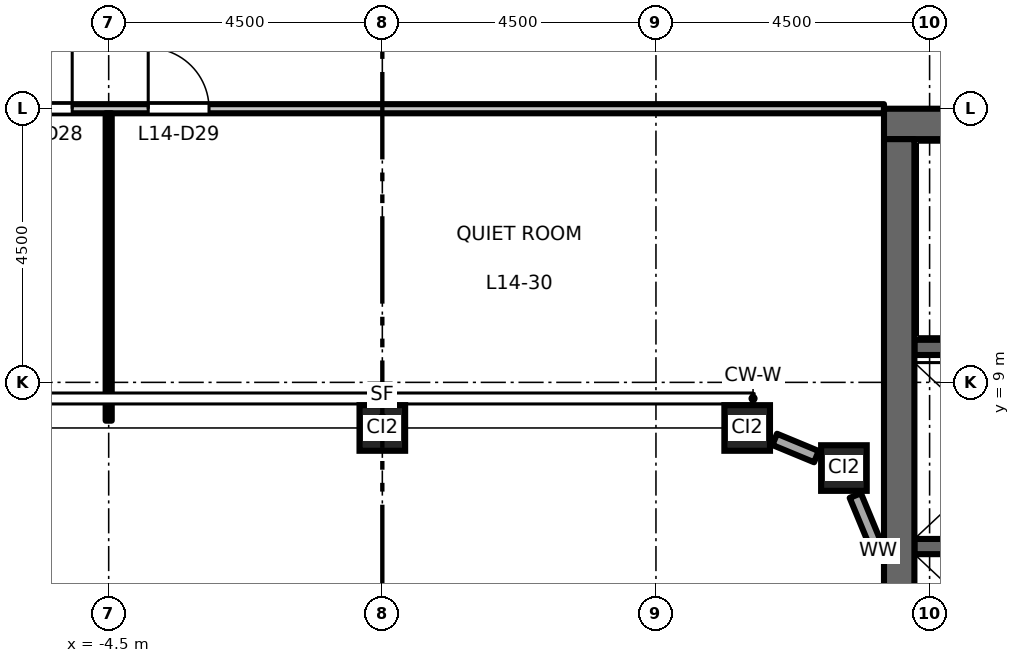
"""IFC4 building model, lengths in metres.
Left out: names, types, materials, properties, quantities, classifications, styles, units other than length and angle.
Written with IfcOpenShell. Run it as: python <this file> out.ifc"""

import sys

from ifc_helpers import new_model, si_unit, direction, frame, frame_2d, origin, origin_2d, place, context, subcontext, project, spatial, rectangle, hollow_rectangle, extrude, element, fill, save


model = new_model("IFC4")
c1 = context("Model", 3, precision=1e-05, world=origin(), true_north=direction((0.0, 1.0)))
c2 = subcontext(c1, "Body", "Model", "MODEL_VIEW")
j1 = project(units=[si_unit("LENGTHUNIT", "METRE"), si_unit("PLANEANGLEUNIT", "RADIAN")], contexts=[c1])
p1 = place(None, origin())
s1 = spatial("IfcSite", under=j1, at=p1, CompositionType="ELEMENT")
p2 = place(p1, origin())
s2 = spatial("IfcBuilding", under=s1, at=p2, CompositionType="ELEMENT")
p3 = place(p2, frame((0.0, 0.0, 67.2)))
s3 = spatial("IfcBuildingStorey", under=s2, at=p3, CompositionType="ELEMENT", Elevation=67.2)
for number, where, z_axis, x_axis in (
    (1, (0.0, 8.25, 0.0), (0.0, 0.0, 1.0), (1.0, 0.0, 0.0)),
    (2, (6.0, 8.25, 0.0), (0.0, 0.0, 1.0), (1.0, 0.0, 0.0)),
    (3, (7.591, 7.591, 0.0), (0.0, 0.0, 1.0), (1.0, 0.0, 0.0)),
):
    element("IfcColumn", number, at=place(p3, frame(where, z_axis=z_axis, x_axis=x_axis)), inside=s3, PredefinedType="COLUMN", context=c2, shape_type="SweptSolid", body=[
        extrude(hollow_rectangle(XDim=0.75, YDim=0.75, WallThickness=0.045, at=origin_2d()), origin(), (0.0, 0.0, 1.0), 4.5),
    ])
p4 = place(p3, frame((8.75, 6.3, 0.0), z_axis=(0.0, 0.0, 1.0), x_axis=(1.0, 0.0, 0.0)))
e4 = element("IfcWall", 4, at=p4, inside=s3, PredefinedType="SHEAR", context=c2, shape_type="SweptSolid", body=[
    extrude(rectangle(XDim=3.1, YDim=0.25, at=frame_2d((1.55, 0.0))), origin(), (0.0, 0.0, 1.0), 4.35),
])
p5 = place(p3, frame((8.75, 9.575, 0.0), z_axis=(0.0, 0.0, 1.0), x_axis=(1.0, 0.0, 0.0)))
e5 = element("IfcWall", 5, at=p5, inside=s3, PredefinedType="SHEAR", context=c2, shape_type="SweptSolid", body=[
    extrude(rectangle(XDim=8.0, YDim=0.25, at=frame_2d((4.0, 0.0))), origin(), (0.0, 0.0, 1.0), 4.35),
])
p6 = place(p5, frame((6.65, 0.0, 0.0)))
e6 = element("IfcOpeningElement", 6, at=p6, cuts=e5, PredefinedType="OPENING", context=c2, shape_type="SweptSolid", body=[
    extrude(rectangle(XDim=1.1, YDim=2.1, at=frame_2d((0.55, 1.05))), frame((0.0, 0.135, 0.0), z_axis=(0.0, -1.0, 0.0), x_axis=(1.0, 0.0, 0.0)), (0.0, 0.0, 1.0), 0.27),
])
p7 = place(p3, frame((8.25, 13.25, 0.0), z_axis=(0.0, 0.0, 1.0), x_axis=(1.0, 0.0, 0.0)))
e7 = element("IfcWall", 7, at=p7, inside=s3, PredefinedType="SHEAR", context=c2, shape_type="SweptSolid", body=[
    extrude(rectangle(XDim=13.5, YDim=0.5, at=frame_2d((6.75, 0.0))), origin(), (0.0, 0.0, 1.0), 4.35),
])
p8 = place(p3, frame((8.5, -13.0, 0.0), z_axis=(0.0, 0.0, 1.0), x_axis=(0.0, 1.0, 0.0)))
e8 = element("IfcWall", 8, at=p8, inside=s3, PredefinedType="SHEAR", context=c2, shape_type="SweptSolid", body=[
    extrude(rectangle(XDim=26.0, YDim=0.5, at=frame_2d((13.0, 0.0))), origin(), (0.0, 0.0, 1.0), 4.35),
])
p9 = place(p3, frame((8.154, 6.231, 0.0), z_axis=(0.0, 0.0, 1.0), x_axis=(-0.382549378284, 0.923935048136, 0.0)))
e9 = element("IfcWall", 9, at=p9, inside=s3, PredefinedType="STANDARD", context=c2, shape_type="SweptSolid", body=[
    extrude(rectangle(XDim=0.982, YDim=0.2, at=frame_2d((0.491, 0.0))), origin(), (0.0, 0.0, 1.0), 3.73),
])
p10 = place(p3, frame((7.138, 7.779, 0.0), z_axis=(0.0, 0.0, 1.0), x_axis=(-0.923940677943, 0.382535780864, 0.0)))
e10 = element("IfcWall", 10, at=p10, inside=s3, PredefinedType="STANDARD", context=c2, shape_type="SweptSolid", body=[
    extrude(rectangle(XDim=0.742, YDim=0.2, at=frame_2d((0.371, 0.0))), origin(), (0.0, 0.0, 1.0), 3.73),
])
p11 = place(p3, frame((-8.25, 13.5, 0.0), z_axis=(0.0, 0.0, 1.0), x_axis=(1.0, 0.0, 0.0)))
e11 = element("IfcWall", 11, at=p11, inside=s3, PredefinedType="PARTITIONING", context=c2, shape_type="SweptSolid", body=[
    extrude(rectangle(XDim=16.5, YDim=0.15, at=frame_2d((8.25, 0.0))), origin(), (0.0, 0.0, 1.0), 3.85),
])
p12 = place(p11, frame((2.15, 0.0, 0.0)))
e12 = element("IfcOpeningElement", 12, at=p12, cuts=e11, PredefinedType="OPENING", context=c2, shape_type="SweptSolid", body=[
    extrude(rectangle(XDim=1.0, YDim=2.1, at=frame_2d((0.5, 1.05))), frame((0.0, 0.085, 0.0), z_axis=(0.0, -1.0, 0.0), x_axis=(1.0, 0.0, 0.0)), (0.0, 0.0, 1.0), 0.17),
])
p13 = place(p11, frame((4.4, 0.0, 0.0)))
e13 = element("IfcOpeningElement", 13, at=p13, cuts=e11, PredefinedType="OPENING", context=c2, shape_type="SweptSolid", body=[
    extrude(rectangle(XDim=1.0, YDim=2.1, at=frame_2d((0.5, 1.05))), frame((0.0, 0.085, 0.0), z_axis=(0.0, -1.0, 0.0), x_axis=(1.0, 0.0, 0.0)), (0.0, 0.0, 1.0), 0.17),
])
p14 = place(p3, frame((-4.5, 8.37, 0.0), z_axis=(0.0, 0.0, 1.0), x_axis=(0.0, 1.0, 0.0)))
e14 = element("IfcWall", 14, at=p14, inside=s3, PredefinedType="PARTITIONING", context=c2, shape_type="SweptSolid", body=[
    extrude(rectangle(XDim=5.055, YDim=0.1, at=frame_2d((2.527, 0.0))), origin(), (0.0, 0.0, 1.0), 3.35),
])
p15 = place(p12, origin())
e15 = element("IfcDoor", 15, at=p15, inside=s3, OperationType="SINGLE_SWING_RIGHT", PredefinedType="DOOR", context=c2, shape_type="SweptSolid", body=[
    extrude(rectangle(XDim=1.0, YDim=2.1, at=frame_2d((0.5, 1.05))), frame((0.0, 0.025, 0.0), z_axis=(0.0, -1.0, 0.0), x_axis=(1.0, 0.0, 0.0)), (0.0, 0.0, 1.0), 0.05),
])
fill(e12, e15)
p16 = place(p13, origin())
e16 = element("IfcDoor", 16, at=p16, inside=s3, OperationType="SINGLE_SWING_LEFT", PredefinedType="DOOR", context=c2, shape_type="SweptSolid", body=[
    extrude(rectangle(XDim=1.0, YDim=2.1, at=frame_2d((0.5, 1.05))), frame((0.0, 0.025, 0.0), z_axis=(0.0, -1.0, 0.0), x_axis=(1.0, 0.0, 0.0)), (0.0, 0.0, 1.0), 0.05),
])
fill(e13, e16)
save(model, sys.argv[1])
